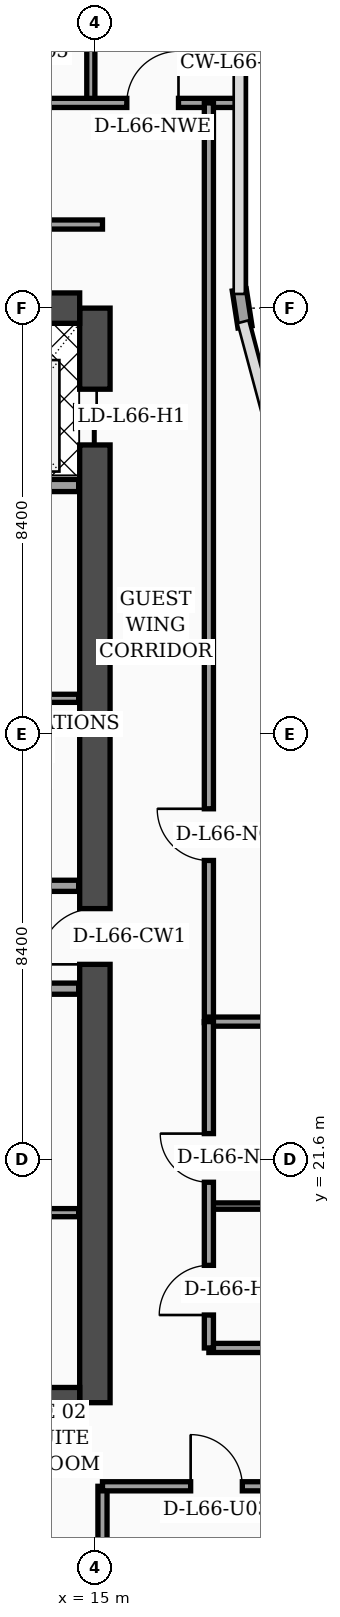
"""IFC4 building model, lengths in metres.
Left out: names, types, materials, properties, quantities, classifications, styles, units other than length and angle.
Written with IfcOpenShell. Run it as: python <this file> out.ifc"""

import sys

from ifc_helpers import new_model, si_unit, direction, frame, frame_2d, origin, place, context, subcontext, project, spatial, rectangle, extrude, element, fill, save


model = new_model("IFC4")
c1 = context("Model", 3, precision=1e-05, world=origin(), true_north=direction((0.0, 1.0)))
c2 = subcontext(c1, "Body", "Model", "MODEL_VIEW")
j1 = project(units=[si_unit("LENGTHUNIT", "METRE"), si_unit("PLANEANGLEUNIT", "RADIAN")], contexts=[c1])
p1 = place(None, origin())
s1 = spatial("IfcSite", under=j1, at=p1, CompositionType="ELEMENT")
p2 = place(p1, origin())
s2 = spatial("IfcBuilding", under=s1, at=p2, CompositionType="ELEMENT")
p3 = place(p2, frame((0.0, 0.0, 267.3)))
s3 = spatial("IfcBuildingStorey", under=s2, at=p3, CompositionType="ELEMENT", Elevation=267.3)
p4 = place(p3, frame((15.0, 16.8, 0.0), z_axis=(0.0, 0.0, 1.0), x_axis=(0.0, 1.0, 0.0)))
e1 = element("IfcWall", 1, at=p4, inside=s3, PredefinedType="SHEAR", context=c2, shape_type="SweptSolid", body=[
    extrude(rectangle(XDim=21.6, YDim=0.6, at=frame_2d((10.8, 0.0))), origin(), (0.0, 0.0, 1.0), 3.56),
])
p5 = place(p4, frame((8.65, 0.0, 0.0)))
e2 = element("IfcOpeningElement", 2, at=p5, cuts=e1, PredefinedType="OPENING", context=c2, shape_type="SweptSolid", body=[
    extrude(rectangle(XDim=1.1, YDim=2.2, at=frame_2d((0.55, 1.1))), frame((0.0, 0.31, 0.0), z_axis=(0.0, -1.0, 0.0), x_axis=(1.0, 0.0, 0.0)), (0.0, 0.0, 1.0), 0.62),
])
p6 = place(p4, frame((18.9, 0.0, 0.0)))
e3 = element("IfcOpeningElement", 3, at=p6, cuts=e1, PredefinedType="OPENING", context=c2, shape_type="SweptSolid", body=[
    extrude(rectangle(XDim=1.1, YDim=2.2, at=frame_2d((0.55, 1.1))), frame((0.0, 0.31, 0.0), z_axis=(0.0, -1.0, 0.0), x_axis=(1.0, 0.0, 0.0)), (0.0, 0.0, 1.0), 0.62),
])
p7 = place(p3, frame((4.5, 38.4, 0.0), z_axis=(0.0, 0.0, 1.0), x_axis=(1.0, 0.0, 0.0)))
e4 = element("IfcWall", 4, at=p7, inside=s3, PredefinedType="SHEAR", context=c2, shape_type="SweptSolid", body=[
    extrude(rectangle(XDim=10.2, YDim=0.6, at=frame_2d((5.1, 0.0))), origin(), (0.0, 0.0, 1.0), 3.56),
])
p8 = place(p7, frame((5.8, 0.0, 0.0)))
e5 = element("IfcOpeningElement", 5, at=p8, cuts=e4, PredefinedType="OPENING", context=c2, shape_type="SweptSolid", body=[
    extrude(rectangle(XDim=1.1, YDim=2.2, at=frame_2d((0.55, 1.1))), frame((0.0, 0.31, 0.0), z_axis=(0.0, -1.0, 0.0), x_axis=(1.0, 0.0, 0.0)), (0.0, 0.0, 1.0), 0.62),
])
p9 = place(p3, frame((4.5, 16.8, 0.0), z_axis=(0.0, 0.0, 1.0), x_axis=(1.0, 0.0, 0.0)))
e6 = element("IfcWall", 6, at=p9, inside=s3, PredefinedType="SHEAR", context=c2, shape_type="SweptSolid", body=[
    extrude(rectangle(XDim=10.2, YDim=0.6, at=frame_2d((5.1, 0.0))), origin(), (0.0, 0.0, 1.0), 3.56),
])
p10 = place(p3, frame((17.962, 38.03, 0.0), z_axis=(0.0, 0.0, 1.0), x_axis=(-0.15141125477, 0.988470855377, 0.0)))
e7 = element("IfcWall", 7, at=p10, inside=s3, PredefinedType="SOLIDWALL", context=c2, shape_type="SweptSolid", body=[
    extrude(rectangle(XDim=0.739, YDim=0.28, at=frame_2d((0.369, 0.0))), origin(), (0.0, 0.0, 1.0), 3.56),
])
p11 = place(p3, frame((9.68, 20.55, 0.0), z_axis=(0.0, 0.0, 1.0), x_axis=(1.0, 0.0, 0.0)))
e8 = element("IfcWall", 8, at=p11, inside=s3, PredefinedType="PARTITIONING", context=c2, shape_type="SweptSolid", body=[
    extrude(rectangle(XDim=5.0, YDim=0.16, at=frame_2d((2.5, 0.0))), origin(), (0.0, 0.0, 1.0), 3.56),
])
p12 = place(p11, frame((1.1, 0.0, 0.0)))
e9 = element("IfcOpeningElement", 9, at=p12, cuts=e8, PredefinedType="OPENING", context=c2, shape_type="SweptSolid", body=[
    extrude(rectangle(XDim=0.98, YDim=2.15, at=frame_2d((0.49, 1.075))), frame((0.0, 0.09, 0.0), z_axis=(0.0, -1.0, 0.0), x_axis=(1.0, 0.0, 0.0)), (0.0, 0.0, 1.0), 0.18),
])
p13 = place(p3, frame((9.68, 24.97, 0.0), z_axis=(0.0, 0.0, 1.0), x_axis=(1.0, 0.0, 0.0)))
e10 = element("IfcWall", 10, at=p13, inside=s3, PredefinedType="SOLIDWALL", context=c2, shape_type="SweptSolid", body=[
    extrude(rectangle(XDim=5.0, YDim=0.22, at=frame_2d((2.5, 0.0))), origin(), (0.0, 0.0, 1.0), 2.99),
])
p14 = place(p13, frame((0.9, 0.0, 0.0)))
e11 = element("IfcOpeningElement", 11, at=p14, cuts=e10, PredefinedType="OPENING", context=c2, shape_type="SweptSolid", body=[
    extrude(rectangle(XDim=0.98, YDim=2.15, at=frame_2d((0.49, 1.075))), frame((0.0, 0.12, 0.0), z_axis=(0.0, -1.0, 0.0), x_axis=(1.0, 0.0, 0.0)), (0.0, 0.0, 1.0), 0.24),
])
p15 = place(p3, frame((12.25, 27.0, 0.0), z_axis=(0.0, 0.0, 1.0), x_axis=(1.0, 0.0, 0.0)))
e12 = element("IfcWall", 12, at=p15, inside=s3, PredefinedType="SOLIDWALL", context=c2, shape_type="SweptSolid", body=[
    extrude(rectangle(XDim=2.43, YDim=0.22, at=frame_2d((1.215, 0.0))), origin(), (0.0, 0.0, 1.0), 3.56),
])
p16 = place(p3, frame((12.25, 30.7, 0.0), z_axis=(0.0, 0.0, 1.0), x_axis=(1.0, 0.0, 0.0)))
e13 = element("IfcWall", 13, at=p16, inside=s3, PredefinedType="PARTITIONING", context=c2, shape_type="SweptSolid", body=[
    extrude(rectangle(XDim=2.43, YDim=0.16, at=frame_2d((1.215, 0.0))), origin(), (0.0, 0.0, 1.0), 3.56),
])
p17 = place(p16, frame((0.55, 0.0, 0.0)))
e14 = element("IfcOpeningElement", 14, at=p17, cuts=e13, PredefinedType="OPENING", context=c2, shape_type="SweptSolid", body=[
    extrude(rectangle(XDim=0.98, YDim=2.15, at=frame_2d((0.49, 1.075))), frame((0.0, 0.09, 0.0), z_axis=(0.0, -1.0, 0.0), x_axis=(1.0, 0.0, 0.0)), (0.0, 0.0, 1.0), 0.18),
])
p18 = place(p3, frame((9.66, 34.9, 0.0), z_axis=(0.0, 0.0, 1.0), x_axis=(1.0, 0.0, 0.0)))
e15 = element("IfcWall", 15, at=p18, inside=s3, PredefinedType="SOLIDWALL", context=c2, shape_type="SweptSolid", body=[
    extrude(rectangle(XDim=5.02, YDim=0.24, at=frame_2d((2.51, 0.0))), origin(), (0.0, 0.0, 1.0), 3.56),
])
p19 = place(p3, frame((15.15, 2.44, 0.0), z_axis=(0.0, 0.0, 1.0), x_axis=(0.0, 1.0, 0.0)))
e16 = element("IfcWall", 16, at=p19, inside=s3, PredefinedType="PARTITIONING", context=c2, shape_type="SweptSolid", body=[
    extrude(rectangle(XDim=12.71, YDim=0.18, at=frame_2d((6.355, 0.0))), origin(), (0.0, 0.0, 1.0), 3.09),
])
p20 = place(p3, frame((15.15, 15.15, 0.0), z_axis=(0.0, 0.0, 1.0), x_axis=(1.0, 0.0, 0.0)))
e17 = element("IfcWall", 17, at=p20, inside=s3, PredefinedType="PARTITIONING", context=c2, shape_type="SweptSolid", body=[
    extrude(rectangle(XDim=6.45, YDim=0.18, at=frame_2d((3.225, 0.0))), origin(), (0.0, 0.0, 1.0), 2.59),
])
p21 = place(p20, frame((1.74, 0.0, 0.0)))
e18 = element("IfcOpeningElement", 18, at=p21, cuts=e17, PredefinedType="OPENING", context=c2, shape_type="SweptSolid", body=[
    extrude(rectangle(XDim=1.02, YDim=2.2, at=frame_2d((0.51, 1.1))), frame((0.0, 0.1, 0.0), z_axis=(0.0, -1.0, 0.0), x_axis=(1.0, 0.0, 0.0)), (0.0, 0.0, 1.0), 0.2),
])
p22 = place(p3, frame((14.92, 42.45, 0.0), z_axis=(0.0, 0.0, 1.0), x_axis=(0.0, 1.0, 0.0)))
e19 = element("IfcWall", 19, at=p22, inside=s3, PredefinedType="PARTITIONING", context=c2, shape_type="SweptSolid", body=[
    extrude(rectangle(XDim=5.35, YDim=0.16, at=frame_2d((2.675, 0.0))), origin(), (0.0, 0.0, 1.0), 3.09),
])
p23 = place(p3, frame((0.08, 42.45, 0.0), z_axis=(0.0, 0.0, 1.0), x_axis=(1.0, 0.0, 0.0)))
e20 = element("IfcWall", 20, at=p23, inside=s3, PredefinedType="PARTITIONING", context=c2, shape_type="SweptSolid", body=[
    extrude(rectangle(XDim=17.77, YDim=0.18, at=frame_2d((8.885, 0.0))), origin(), (0.0, 0.0, 1.0), 2.99),
])
p24 = place(p23, frame((0.9, 0.0, 0.0)))
e21 = element("IfcOpeningElement", 21, at=p24, cuts=e20, PredefinedType="OPENING", context=c2, shape_type="SweptSolid", body=[
    extrude(rectangle(XDim=1.02, YDim=2.2, at=frame_2d((0.51, 1.1))), frame((0.0, 0.1, 0.0), z_axis=(0.0, -1.0, 0.0), x_axis=(1.0, 0.0, 0.0)), (0.0, 0.0, 1.0), 0.2),
])
p25 = place(p23, frame((4.57, 0.0, 0.0)))
e22 = element("IfcOpeningElement", 22, at=p25, cuts=e20, PredefinedType="OPENING", context=c2, shape_type="SweptSolid", body=[
    extrude(rectangle(XDim=1.02, YDim=2.2, at=frame_2d((0.51, 1.1))), frame((0.0, 0.1, 0.0), z_axis=(0.0, -1.0, 0.0), x_axis=(1.0, 0.0, 0.0)), (0.0, 0.0, 1.0), 0.2),
])
p26 = place(p23, frame((10.46, 0.0, 0.0)))
e23 = element("IfcOpeningElement", 23, at=p26, cuts=e20, PredefinedType="OPENING", context=c2, shape_type="SweptSolid", body=[
    extrude(rectangle(XDim=1.02, YDim=2.2, at=frame_2d((0.51, 1.1))), frame((0.0, 0.1, 0.0), z_axis=(0.0, -1.0, 0.0), x_axis=(1.0, 0.0, 0.0)), (0.0, 0.0, 1.0), 0.2),
])
p27 = place(p23, frame((15.55, 0.0, 0.0)))
e24 = element("IfcOpeningElement", 24, at=p27, cuts=e20, PredefinedType="OPENING", context=c2, shape_type="SweptSolid", body=[
    extrude(rectangle(XDim=1.02, YDim=2.2, at=frame_2d((0.51, 1.1))), frame((0.0, 0.1, 0.0), z_axis=(0.0, -1.0, 0.0), x_axis=(1.0, 0.0, 0.0)), (0.0, 0.0, 1.0), 0.2),
])
p28 = place(p3, frame((17.25, 24.3, 0.0), z_axis=(0.0, 0.0, 1.0), x_axis=(0.0, 1.0, 0.0)))
e25 = element("IfcWall", 25, at=p28, inside=s3, PredefinedType="PARTITIONING", context=c2, shape_type="SweptSolid", body=[
    extrude(rectangle(XDim=18.15, YDim=0.18, at=frame_2d((9.075, 0.0))), origin(), (0.0, 0.0, 1.0), 2.99),
])
p29 = place(p28, frame((3.2, 0.0, 0.0)))
e26 = element("IfcOpeningElement", 26, at=p29, cuts=e25, PredefinedType="OPENING", context=c2, shape_type="SweptSolid", body=[
    extrude(rectangle(XDim=1.02, YDim=2.2, at=frame_2d((0.51, 1.1))), frame((0.0, 0.1, 0.0), z_axis=(0.0, -1.0, 0.0), x_axis=(1.0, 0.0, 0.0)), (0.0, 0.0, 1.0), 0.2),
])
p30 = place(p3, frame((3.88, 40.05, 0.0), z_axis=(0.0, 0.0, 1.0), x_axis=(1.0, 0.0, 0.0)))
e27 = element("IfcWall", 27, at=p30, inside=s3, PredefinedType="PARTITIONING", context=c2, shape_type="SweptSolid", body=[
    extrude(rectangle(XDim=11.27, YDim=0.18, at=frame_2d((5.635, 0.0))), origin(), (0.0, 0.0, 1.0), 2.99),
])
p31 = place(p3, frame((17.25, 17.88, 0.0), z_axis=(0.0, 0.0, 1.0), x_axis=(1.0, 0.0, 0.0)))
e28 = element("IfcWall", 28, at=p31, inside=s3, PredefinedType="PARTITIONING", context=c2, shape_type="SweptSolid", body=[
    extrude(rectangle(XDim=4.3, YDim=0.18, at=frame_2d((2.15, 0.0))), origin(), (0.0, 0.0, 1.0), 3.09),
])
p32 = place(p3, frame((17.25, 20.68, 0.0), z_axis=(0.0, 0.0, 1.0), x_axis=(1.0, 0.0, 0.0)))
e29 = element("IfcWall", 29, at=p32, inside=s3, PredefinedType="PARTITIONING", context=c2, shape_type="SweptSolid", body=[
    extrude(rectangle(XDim=4.3, YDim=0.125, at=frame_2d((2.15, 0.0))), origin(), (0.0, 0.0, 1.0), 3.56),
])
p33 = place(p3, frame((17.25, 24.32, 0.0), z_axis=(0.0, 0.0, 1.0), x_axis=(1.0, 0.0, 0.0)))
e30 = element("IfcWall", 30, at=p33, inside=s3, PredefinedType="PARTITIONING", context=c2, shape_type="SweptSolid", body=[
    extrude(rectangle(XDim=4.35, YDim=0.18, at=frame_2d((2.175, 0.0))), origin(), (0.0, 0.0, 1.0), 3.56),
])
p34 = place(p3, frame((17.25, 17.88, 0.0), z_axis=(0.0, 0.0, 1.0), x_axis=(0.0, 1.0, 0.0)))
e31 = element("IfcWall", 31, at=p34, inside=s3, PredefinedType="PARTITIONING", context=c2, shape_type="SweptSolid", body=[
    extrude(rectangle(XDim=6.44, YDim=0.18, at=frame_2d((3.22, 0.0))), origin(), (0.0, 0.0, 1.0), 3.09),
])
p35 = place(p34, frame((0.65, 0.0, 0.0)))
e32 = element("IfcOpeningElement", 32, at=p35, cuts=e31, PredefinedType="OPENING", context=c2, shape_type="SweptSolid", body=[
    extrude(rectangle(XDim=0.98, YDim=2.15, at=frame_2d((0.49, 1.075))), frame((0.0, 0.1, 0.0), z_axis=(0.0, -1.0, 0.0), x_axis=(1.0, 0.0, 0.0)), (0.0, 0.0, 1.0), 0.2),
])
p36 = place(p34, frame((3.27, 0.0, 0.0)))
e33 = element("IfcOpeningElement", 33, at=p36, cuts=e31, PredefinedType="OPENING", context=c2, shape_type="SweptSolid", body=[
    extrude(rectangle(XDim=0.96, YDim=2.2, at=frame_2d((0.48, 1.1))), frame((0.0, 0.1, 0.0), z_axis=(0.0, -1.0, 0.0), x_axis=(1.0, 0.0, 0.0)), (0.0, 0.0, 1.0), 0.2),
])
p37 = place(p21, origin())
e34 = element("IfcDoor", 34, at=p37, inside=s3, OperationType="SINGLE_SWING_LEFT", PredefinedType="DOOR", context=c2, shape_type="SweptSolid", body=[
    extrude(rectangle(XDim=1.02, YDim=2.2, at=frame_2d((0.51, 1.1))), frame((0.0, 0.025, 0.0), z_axis=(0.0, -1.0, 0.0), x_axis=(1.0, 0.0, 0.0)), (0.0, 0.0, 1.0), 0.05),
])
fill(e18, e34)
p38 = place(p27, origin())
e35 = element("IfcDoor", 35, at=p38, inside=s3, OperationType="SINGLE_SWING_RIGHT", PredefinedType="DOOR", context=c2, shape_type="SweptSolid", body=[
    extrude(rectangle(XDim=1.02, YDim=2.2, at=frame_2d((0.51, 1.1))), frame((0.0, 0.025, 0.0), z_axis=(0.0, -1.0, 0.0), x_axis=(1.0, 0.0, 0.0)), (0.0, 0.0, 1.0), 0.05),
])
fill(e24, e35)
p39 = place(p29, origin())
e36 = element("IfcDoor", 36, at=p39, inside=s3, OperationType="SINGLE_SWING_RIGHT", PredefinedType="DOOR", context=c2, shape_type="SweptSolid", body=[
    extrude(rectangle(XDim=1.02, YDim=2.2, at=frame_2d((0.51, 1.1))), frame((0.0, 0.025, 0.0), z_axis=(0.0, -1.0, 0.0), x_axis=(1.0, 0.0, 0.0)), (0.0, 0.0, 1.0), 0.05),
])
fill(e26, e36)
p40 = place(p35, origin())
e37 = element("IfcDoor", 37, at=p40, inside=s3, OperationType="SINGLE_SWING_LEFT", PredefinedType="DOOR", context=c2, shape_type="SweptSolid", body=[
    extrude(rectangle(XDim=0.98, YDim=2.15, at=frame_2d((0.49, 1.075))), frame((0.0, 0.025, 0.0), z_axis=(0.0, -1.0, 0.0), x_axis=(1.0, 0.0, 0.0)), (0.0, 0.0, 1.0), 0.05),
])
fill(e32, e37)
p41 = place(p36, origin())
e38 = element("IfcDoor", 38, at=p41, inside=s3, OperationType="SINGLE_SWING_RIGHT", PredefinedType="DOOR", context=c2, shape_type="SweptSolid", body=[
    extrude(rectangle(XDim=0.96, YDim=2.2, at=frame_2d((0.48, 1.1))), frame((0.0, 0.025, 0.0), z_axis=(0.0, -1.0, 0.0), x_axis=(1.0, 0.0, 0.0)), (0.0, 0.0, 1.0), 0.05),
])
fill(e33, e38)
p42 = place(p5, origin())
e39 = element("IfcDoor", 39, at=p42, inside=s3, OperationType="SINGLE_SWING_LEFT", PredefinedType="DOOR", context=c2, shape_type="SweptSolid", body=[
    extrude(rectangle(XDim=1.1, YDim=2.2, at=frame_2d((0.55, 1.1))), frame((0.0, 0.025, 0.0), z_axis=(0.0, -1.0, 0.0), x_axis=(1.0, 0.0, 0.0)), (0.0, 0.0, 1.0), 0.05),
])
fill(e2, e39)
p43 = place(p6, origin())
e40 = element("IfcDoor", 40, at=p43, inside=s3, OperationType="DOUBLE_DOOR_SLIDING", PredefinedType="DOOR", context=c2, shape_type="SweptSolid", body=[
    extrude(rectangle(XDim=1.1, YDim=2.2, at=frame_2d((0.55, 1.1))), frame((0.0, 0.025, 0.0), z_axis=(0.0, -1.0, 0.0), x_axis=(1.0, 0.0, 0.0)), (0.0, 0.0, 1.0), 0.05),
])
fill(e3, e40)
save(model, sys.argv[1])
